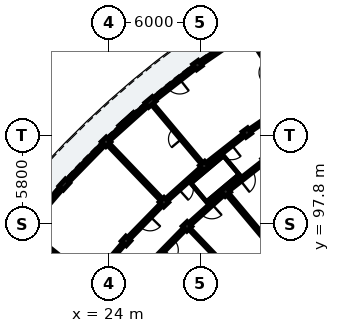
"""IFC4 building model, lengths in metres.
Left out: names, types, materials, properties, quantities, classifications, styles, units other than length and angle.
Written with IfcOpenShell. Run it as: python <this file> out.ifc"""

import sys

from ifc_helpers import new_model, si_unit, direction, frame, frame_2d, origin, origin_2d, place, context, subcontext, project, spatial, rectangle, extrude, element, fill, save


model = new_model("IFC4")
c1 = context("Model", 3, precision=1e-05, world=origin(), true_north=direction((0.0, 1.0)))
c2 = subcontext(c1, "Body", "Model", "MODEL_VIEW")
j1 = project(units=[si_unit("LENGTHUNIT", "METRE"), si_unit("PLANEANGLEUNIT", "RADIAN")], contexts=[c1])
p1 = place(None, origin())
s1 = spatial("IfcSite", under=j1, at=p1, CompositionType="ELEMENT")
p2 = place(p1, origin())
s2 = spatial("IfcBuilding", under=s1, at=p2, CompositionType="ELEMENT")
p3 = place(p2, frame((0.0, 0.0, 42.44)))
s3 = spatial("IfcBuildingStorey", under=s2, at=p3, CompositionType="ELEMENT", Elevation=42.44)
for number, where, z_axis, x_axis in (
    (1, (33.061, 103.804, 0.0), (0.0, 0.0, 1.0), (-0.591, 0.807, 0.0)),
    (2, (29.811, 108.241, 0.0), (0.0, 0.0, 1.0), (-0.591, 0.807, 0.0)),
    (3, (31.671, 99.919, 0.0), (0.0, 0.0, 1.0), (-0.643, 0.766, 0.0)),
    (4, (30.257, 101.605, 0.0), (0.0, 0.0, 1.0), (-0.643, 0.766, 0.0)),
):
    element("IfcColumn", number, at=place(p3, frame(where, z_axis=z_axis, x_axis=x_axis)), inside=s3, PredefinedType="COLUMN", context=c2, shape_type="SweptSolid", body=[
        extrude(rectangle(XDim=0.45, YDim=0.45, at=origin_2d()), origin(), (0.0, 0.0, 1.0), 3.12),
    ])
p4 = place(p3, frame((26.722, 105.818, 0.0), z_axis=(0.0, 0.0, 1.0), x_axis=(-0.642787636427, 0.766044420681, 0.0)))
e5 = element("IfcColumn", 5, at=p4, inside=s3, PredefinedType="PILASTER", context=c2, shape_type="SweptSolid", body=[
    extrude(rectangle(XDim=0.39, YDim=0.63, at=origin_2d()), origin(), (0.0, 0.0, 1.0), 3.12),
])
for number, where, z_axis, x_axis in (
    (6, (29.127, 97.637, 0.0), (0.0, 0.0, 1.0), (-0.692, 0.722, 0.0)),
    (7, (27.605, 99.226, 0.0), (0.0, 0.0, 1.0), (-0.692, 0.722, 0.0)),
    (8, (23.8, 103.197, 0.0), (0.0, 0.0, 1.0), (-0.692, 0.722, 0.0)),
    (9, (25.115, 96.677, 0.0), (0.0, 0.0, 1.0), (-0.738, 0.675, 0.0)),
):
    element("IfcColumn", number, at=place(p3, frame(where, z_axis=z_axis, x_axis=x_axis)), inside=s3, PredefinedType="COLUMN", context=c2, shape_type="SweptSolid", body=[
        extrude(rectangle(XDim=0.45, YDim=0.45, at=origin_2d()), origin(), (0.0, 0.0, 1.0), 3.12),
    ])
p5 = place(p3, frame((21.056, 100.389, 0.0), z_axis=(0.0, 0.0, 1.0), x_axis=(-0.737932089665, 0.674874974378, 0.0)))
e10 = element("IfcColumn", 10, at=p5, inside=s3, PredefinedType="PILASTER", context=c2, shape_type="SweptSolid", body=[
    extrude(rectangle(XDim=0.39, YDim=0.63, at=origin_2d()), origin(), (0.0, 0.0, 1.0), 3.12),
])
p6 = place(p3, frame((32.916, 110.362, 0.0), z_axis=(0.0, 0.0, 1.0), x_axis=(-0.825772203118, -0.564003784169, 0.0)))
e11 = element("IfcWall", 11, at=p6, inside=s3, PredefinedType="SOLIDWALL", context=c2, shape_type="SweptSolid", body=[
    extrude(rectangle(XDim=3.566, YDim=0.225, at=frame_2d((1.783, 0.0))), origin(), (0.0, 0.0, 1.0), 2.355),
])
p7 = place(p6, frame((0.943, 0.0, 0.55)))
e12 = element("IfcOpeningElement", 12, at=p7, cuts=e11, PredefinedType="OPENING", context=c2, shape_type="SweptSolid", body=[
    extrude(rectangle(XDim=1.68, YDim=1.585, at=frame_2d((0.84, 0.792))), frame((0.0, 0.123, 0.0), z_axis=(0.0, -1.0, 0.0), x_axis=(1.0, 0.0, 0.0)), (0.0, 0.0, 1.0), 0.245),
])
p8 = place(p3, frame((29.657, 108.121, 0.0), z_axis=(0.0, 0.0, 1.0), x_axis=(-0.786798003455, -0.617210581374, 0.0)))
e13 = element("IfcWall", 13, at=p8, inside=s3, PredefinedType="SOLIDWALL", context=c2, shape_type="SweptSolid", body=[
    extrude(rectangle(XDim=3.566, YDim=0.225, at=frame_2d((1.783, 0.0))), origin(), (0.0, 0.0, 1.0), 2.355),
])
p9 = place(p8, frame((1.293, 0.0, 0.0)))
e14 = element("IfcOpeningElement", 14, at=p9, cuts=e13, PredefinedType="OPENING", context=c2, shape_type="SweptSolid", body=[
    extrude(rectangle(XDim=0.98, YDim=2.12, at=frame_2d((0.49, 1.06))), frame((0.0, 0.123, 0.0), z_axis=(0.0, -1.0, 0.0), x_axis=(1.0, 0.0, 0.0)), (0.0, 0.0, 1.0), 0.245),
])
p10 = place(p3, frame((26.599, 105.708, 0.0), z_axis=(0.0, 0.0, 1.0), x_axis=(-0.744409820675, -0.667723010598, 0.0)))
e15 = element("IfcWall", 15, at=p10, inside=s3, PredefinedType="SOLIDWALL", context=c2, shape_type="SweptSolid", body=[
    extrude(rectangle(XDim=3.566, YDim=0.225, at=frame_2d((1.783, 0.0))), origin(), (0.0, 0.0, 1.0), 2.355),
])
p11 = place(p10, frame((1.133, 0.0, 0.55)))
e16 = element("IfcOpeningElement", 16, at=p11, cuts=e15, PredefinedType="OPENING", context=c2, shape_type="SweptSolid", body=[
    extrude(rectangle(XDim=1.3, YDim=1.6, at=frame_2d((0.65, 0.8))), frame((0.0, 0.123, 0.0), z_axis=(0.0, -1.0, 0.0), x_axis=(1.0, 0.0, 0.0)), (0.0, 0.0, 1.0), 0.245),
])
p12 = place(p3, frame((23.663, 103.057, 0.0), z_axis=(0.0, 0.0, 1.0), x_axis=(-0.698843003546, -0.715275091412, 0.0)))
e17 = element("IfcWall", 17, at=p12, inside=s3, PredefinedType="SOLIDWALL", context=c2, shape_type="SweptSolid", body=[
    extrude(rectangle(XDim=3.566, YDim=0.225, at=frame_2d((1.783, 0.0))), origin(), (0.0, 0.0, 1.0), 2.355),
])
p13 = place(p12, frame((1.058, 0.0, 0.35)))
e18 = element("IfcOpeningElement", 18, at=p13, cuts=e17, PredefinedType="OPENING", context=c2, shape_type="SweptSolid", body=[
    extrude(rectangle(XDim=1.45, YDim=1.7, at=frame_2d((0.725, 0.85))), frame((0.0, 0.123, 0.0), z_axis=(0.0, -1.0, 0.0), x_axis=(1.0, 0.0, 0.0)), (0.0, 0.0, 1.0), 0.245),
])
p14 = place(p3, frame((20.949, 100.263, 0.0), z_axis=(0.0, 0.0, 1.0), x_axis=(-0.650170917935, -0.759787981921, 0.0)))
e19 = element("IfcWall", 19, at=p14, inside=s3, PredefinedType="SOLIDWALL", context=c2, shape_type="SweptSolid", body=[
    extrude(rectangle(XDim=3.566, YDim=0.225, at=frame_2d((1.783, 0.0))), origin(), (0.0, 0.0, 1.0), 2.355),
])
p15 = place(p14, frame((0.983, 0.0, 0.35)))
e20 = element("IfcOpeningElement", 20, at=p15, cuts=e19, PredefinedType="OPENING", context=c2, shape_type="SweptSolid", body=[
    extrude(rectangle(XDim=1.6, YDim=1.75, at=frame_2d((0.8, 0.875))), frame((0.0, 0.123, 0.0), z_axis=(0.0, -1.0, 0.0), x_axis=(1.0, 0.0, 0.0)), (0.0, 0.0, 1.0), 0.245),
])
p16 = place(p3, frame((35.789, 106.151, 0.0), z_axis=(0.0, 0.0, 1.0), x_axis=(-0.536492262982, 0.843905238614, 0.0)))
e21 = element("IfcWall", 21, at=p16, inside=s3, PredefinedType="PARTITIONING", context=c2, shape_type="SweptSolid", body=[
    extrude(rectangle(XDim=4.7, YDim=0.125, at=frame_2d((2.35, 0.0))), origin(), (0.0, 0.0, 1.0), 2.37),
])
p17 = place(p16, frame((1.895, 0.0, 0.0)))
e22 = element("IfcOpeningElement", 22, at=p17, cuts=e21, PredefinedType="OPENING", context=c2, shape_type="SweptSolid", body=[
    extrude(rectangle(XDim=0.91, YDim=2.1, at=frame_2d((0.455, 1.05))), frame((0.0, 0.073, 0.0), z_axis=(0.0, -1.0, 0.0), x_axis=(1.0, 0.0, 0.0)), (0.0, 0.0, 1.0), 0.145),
])
p18 = place(p3, frame((35.714, 105.616, 0.0), z_axis=(0.0, 0.0, 1.0), x_axis=(-0.825779671787, -0.563992848947, 0.0)))
e23 = element("IfcWall", 23, at=p18, inside=s3, PredefinedType="PARTITIONING", context=c2, shape_type="SweptSolid", body=[
    extrude(rectangle(XDim=2.863, YDim=0.205, at=frame_2d((1.432, 0.0))), origin(), (0.0, 0.0, 1.0), 2.37),
])
p19 = place(p18, frame((0.967, 0.0, 0.0)))
e24 = element("IfcOpeningElement", 24, at=p19, cuts=e23, PredefinedType="OPENING", context=c2, shape_type="SweptSolid", body=[
    extrude(rectangle(XDim=0.93, YDim=2.12, at=frame_2d((0.465, 1.06))), frame((0.0, 0.113, 0.0), z_axis=(0.0, -1.0, 0.0), x_axis=(1.0, 0.0, 0.0)), (0.0, 0.0, 1.0), 0.225),
])
p20 = place(p3, frame((32.785, 103.588, 0.0), z_axis=(0.0, 0.0, 1.0), x_axis=(-0.786806323554, -0.617199975061, 0.0)))
e25 = element("IfcWall", 25, at=p20, inside=s3, PredefinedType="PARTITIONING", context=c2, shape_type="SweptSolid", body=[
    extrude(rectangle(XDim=2.863, YDim=0.205, at=frame_2d((1.432, 0.0))), origin(), (0.0, 0.0, 1.0), 2.37),
])
p21 = place(p20, frame((0.937, 0.0, 0.0)))
e26 = element("IfcOpeningElement", 26, at=p21, cuts=e25, PredefinedType="OPENING", context=c2, shape_type="SweptSolid", body=[
    extrude(rectangle(XDim=0.99, YDim=2.16, at=frame_2d((0.495, 1.08))), frame((0.0, 0.113, 0.0), z_axis=(0.0, -1.0, 0.0), x_axis=(1.0, 0.0, 0.0)), (0.0, 0.0, 1.0), 0.225),
])
p22 = place(p3, frame((34.085, 101.813, 0.0), z_axis=(0.0, 0.0, 1.0), x_axis=(-0.786835457019, -0.617162833924, 0.0)))
e27 = element("IfcWall", 27, at=p22, inside=s3, PredefinedType="PARTITIONING", context=c2, shape_type="SweptSolid", body=[
    extrude(rectangle(XDim=2.718, YDim=0.205, at=frame_2d((1.359, 0.0))), origin(), (0.0, 0.0, 1.0), 2.37),
])
p23 = place(p22, frame((0.864, 0.0, 0.0)))
e28 = element("IfcOpeningElement", 28, at=p23, cuts=e27, PredefinedType="OPENING", context=c2, shape_type="SweptSolid", body=[
    extrude(rectangle(XDim=0.99, YDim=2.16, at=frame_2d((0.495, 1.08))), frame((0.0, 0.113, 0.0), z_axis=(0.0, -1.0, 0.0), x_axis=(1.0, 0.0, 0.0)), (0.0, 0.0, 1.0), 0.225),
])
p24 = place(p3, frame((30.0, 101.911, 0.0), z_axis=(0.0, 0.0, 1.0), x_axis=(-0.642811926223, 0.766024038465, 0.0)))
e29 = element("IfcWall", 29, at=p24, inside=s3, PredefinedType="PLUMBINGWALL", context=c2, shape_type="SweptSolid", body=[
    extrude(rectangle(XDim=4.7, YDim=0.14, at=frame_2d((2.35, 0.0))), origin(), (0.0, 0.0, 1.0), 2.37),
])
p25 = place(p24, frame((1.92, 0.0, 0.0)))
e30 = element("IfcOpeningElement", 30, at=p25, cuts=e29, PredefinedType="OPENING", context=c2, shape_type="SweptSolid", body=[
    extrude(rectangle(XDim=0.86, YDim=2.06, at=frame_2d((0.43, 1.03))), frame((0.0, 0.08, 0.0), z_axis=(0.0, -1.0, 0.0), x_axis=(1.0, 0.0, 0.0)), (0.0, 0.0, 1.0), 0.16),
])
p26 = place(p3, frame((36.171, 94.557, 0.0), z_axis=(0.0, 0.0, 1.0), x_axis=(-0.642789470807, 0.766042881449, 0.0)))
e31 = element("IfcWall", 31, at=p26, inside=s3, PredefinedType="PARTITIONING", context=c2, shape_type="SweptSolid", body=[
    extrude(rectangle(XDim=6.6, YDim=0.185, at=frame_2d((3.3, 0.0))), origin(), (0.0, 0.0, 1.0), 2.37),
])
p27 = place(p3, frame((29.997, 101.371, 0.0), z_axis=(0.0, 0.0, 1.0), x_axis=(-0.744433521088, -0.667696587291, 0.0)))
e32 = element("IfcWall", 32, at=p27, inside=s3, PredefinedType="PARTITIONING", context=c2, shape_type="SweptSolid", body=[
    extrude(rectangle(XDim=2.863, YDim=0.205, at=frame_2d((1.432, 0.0))), origin(), (0.0, 0.0, 1.0), 2.37),
])
p28 = place(p27, frame((0.947, 0.0, 0.0)))
e33 = element("IfcOpeningElement", 33, at=p28, cuts=e32, PredefinedType="OPENING", context=c2, shape_type="SweptSolid", body=[
    extrude(rectangle(XDim=0.97, YDim=2.15, at=frame_2d((0.485, 1.075))), frame((0.0, 0.113, 0.0), z_axis=(0.0, -1.0, 0.0), x_axis=(1.0, 0.0, 0.0)), (0.0, 0.0, 1.0), 0.225),
])
p29 = place(p3, frame((31.411, 99.686, 0.0), z_axis=(0.0, 0.0, 1.0), x_axis=(-0.744418559135, -0.667713268413, 0.0)))
e34 = element("IfcWall", 34, at=p29, inside=s3, PredefinedType="PARTITIONING", context=c2, shape_type="SweptSolid", body=[
    extrude(rectangle(XDim=2.718, YDim=0.205, at=frame_2d((1.359, 0.0))), origin(), (0.0, 0.0, 1.0), 2.37),
])
p30 = place(p29, frame((0.874, 0.0, 0.0)))
e35 = element("IfcOpeningElement", 35, at=p30, cuts=e34, PredefinedType="OPENING", context=c2, shape_type="SweptSolid", body=[
    extrude(rectangle(XDim=0.97, YDim=2.15, at=frame_2d((0.485, 1.075))), frame((0.0, 0.113, 0.0), z_axis=(0.0, -1.0, 0.0), x_axis=(1.0, 0.0, 0.0)), (0.0, 0.0, 1.0), 0.225),
])
p31 = place(p3, frame((27.328, 99.514, 0.0), z_axis=(0.0, 0.0, 1.0), x_axis=(-0.691882799356, 0.722009828157, 0.0)))
e36 = element("IfcWall", 36, at=p31, inside=s3, PredefinedType="PARTITIONING", context=c2, shape_type="SweptSolid", body=[
    extrude(rectangle(XDim=4.7, YDim=0.185, at=frame_2d((2.35, 0.0))), origin(), (0.0, 0.0, 1.0), 2.37),
])
p32 = place(p3, frame((33.97, 92.583, 0.0), z_axis=(0.0, 0.0, 1.0), x_axis=(-0.691872422458, 0.722019771919, 0.0)))
e37 = element("IfcWall", 37, at=p32, inside=s3, PredefinedType="PARTITIONING", context=c2, shape_type="SweptSolid", body=[
    extrude(rectangle(XDim=6.6, YDim=0.125, at=frame_2d((3.3, 0.0))), origin(), (0.0, 0.0, 1.0), 2.37),
])
p33 = place(p32, frame((2.855, 0.0, 0.0)))
e38 = element("IfcOpeningElement", 38, at=p33, cuts=e37, PredefinedType="OPENING", context=c2, shape_type="SweptSolid", body=[
    extrude(rectangle(XDim=0.89, YDim=2.1, at=frame_2d((0.445, 1.05))), frame((0.0, 0.073, 0.0), z_axis=(0.0, -1.0, 0.0), x_axis=(1.0, 0.0, 0.0)), (0.0, 0.0, 1.0), 0.145),
])
p34 = place(p3, frame((27.36, 98.975, 0.0), z_axis=(0.0, 0.0, 1.0), x_axis=(-0.698787219683, -0.715329589496, 0.0)))
e39 = element("IfcWall", 39, at=p34, inside=s3, PredefinedType="PARTITIONING", context=c2, shape_type="SweptSolid", body=[
    extrude(rectangle(XDim=2.863, YDim=0.205, at=frame_2d((1.432, 0.0))), origin(), (0.0, 0.0, 1.0), 2.37),
])
p35 = place(p34, frame((0.957, 0.0, 0.0)))
e40 = element("IfcOpeningElement", 40, at=p35, cuts=e39, PredefinedType="OPENING", context=c2, shape_type="SweptSolid", body=[
    extrude(rectangle(XDim=0.95, YDim=2.13, at=frame_2d((0.475, 1.065))), frame((0.0, 0.113, 0.0), z_axis=(0.0, -1.0, 0.0), x_axis=(1.0, 0.0, 0.0)), (0.0, 0.0, 1.0), 0.225),
])
p36 = place(p3, frame((28.882, 97.387, 0.0), z_axis=(0.0, 0.0, 1.0), x_axis=(-0.698840007829, -0.715278018296, 0.0)))
e41 = element("IfcWall", 41, at=p36, inside=s3, PredefinedType="PARTITIONING", context=c2, shape_type="SweptSolid", body=[
    extrude(rectangle(XDim=2.718, YDim=0.205, at=frame_2d((1.359, 0.0))), origin(), (0.0, 0.0, 1.0), 2.37),
])
p37 = place(p36, frame((0.884, 0.0, 0.0)))
e42 = element("IfcOpeningElement", 42, at=p37, cuts=e41, PredefinedType="OPENING", context=c2, shape_type="SweptSolid", body=[
    extrude(rectangle(XDim=0.95, YDim=2.13, at=frame_2d((0.475, 1.065))), frame((0.0, 0.113, 0.0), z_axis=(0.0, -1.0, 0.0), x_axis=(1.0, 0.0, 0.0)), (0.0, 0.0, 1.0), 0.225),
])
p38 = place(p3, frame((24.887, 96.411, 0.0), z_axis=(0.0, 0.0, 1.0), x_axis=(-0.650194272684, -0.759767996015, 0.0)))
e43 = element("IfcWall", 43, at=p38, inside=s3, PredefinedType="PARTITIONING", context=c2, shape_type="SweptSolid", body=[
    extrude(rectangle(XDim=2.863, YDim=0.205, at=frame_2d((1.432, 0.0))), origin(), (0.0, 0.0, 1.0), 2.37),
])
p39 = place(p38, frame((0.967, 0.0, 0.0)))
e44 = element("IfcOpeningElement", 44, at=p39, cuts=e43, PredefinedType="OPENING", context=c2, shape_type="SweptSolid", body=[
    extrude(rectangle(XDim=0.93, YDim=2.12, at=frame_2d((0.465, 1.06))), frame((0.0, 0.113, 0.0), z_axis=(0.0, -1.0, 0.0), x_axis=(1.0, 0.0, 0.0)), (0.0, 0.0, 1.0), 0.225),
])
p40 = place(p3, frame((22.486, 94.22, 0.0), z_axis=(0.0, 0.0, 1.0), x_axis=(-0.780807994362, 0.624771058821, 0.0)))
e45 = element("IfcWall", 45, at=p40, inside=s3, PredefinedType="PARTITIONING", context=c2, shape_type="SweptSolid", body=[
    extrude(rectangle(XDim=4.7, YDim=0.185, at=frame_2d((2.35, 0.0))), origin(), (0.0, 0.0, 1.0), 2.37),
])
p41 = place(p7, origin())
e46 = element("IfcWindow", 46, at=p41, inside=s3, PartitioningType="SINGLE_PANEL", PredefinedType="WINDOW", context=c2, shape_type="SweptSolid", body=[
    extrude(rectangle(XDim=1.68, YDim=1.585, at=frame_2d((0.84, 0.792))), frame((0.0, 0.03, 0.0), z_axis=(0.0, -1.0, 0.0), x_axis=(1.0, 0.0, 0.0)), (0.0, 0.0, 1.0), 0.06),
])
fill(e12, e46)
p42 = place(p9, origin())
e47 = element("IfcDoor", 47, at=p42, inside=s3, OperationType="SINGLE_SWING_LEFT", PredefinedType="DOOR", context=c2, shape_type="SweptSolid", body=[
    extrude(rectangle(XDim=0.98, YDim=2.12, at=frame_2d((0.49, 1.06))), frame((0.0, 0.025, 0.0), z_axis=(0.0, -1.0, 0.0), x_axis=(1.0, 0.0, 0.0)), (0.0, 0.0, 1.0), 0.05),
])
fill(e14, e47)
p43 = place(p11, origin())
e48 = element("IfcWindow", 48, at=p43, inside=s3, PartitioningType="SINGLE_PANEL", PredefinedType="WINDOW", context=c2, shape_type="SweptSolid", body=[
    extrude(rectangle(XDim=1.3, YDim=1.6, at=frame_2d((0.65, 0.8))), frame((0.0, 0.03, 0.0), z_axis=(0.0, -1.0, 0.0), x_axis=(1.0, 0.0, 0.0)), (0.0, 0.0, 1.0), 0.06),
])
fill(e16, e48)
p44 = place(p13, origin())
e49 = element("IfcWindow", 49, at=p44, inside=s3, PartitioningType="SINGLE_PANEL", PredefinedType="WINDOW", context=c2, shape_type="SweptSolid", body=[
    extrude(rectangle(XDim=1.45, YDim=1.7, at=frame_2d((0.725, 0.85))), frame((0.0, 0.03, 0.0), z_axis=(0.0, -1.0, 0.0), x_axis=(1.0, 0.0, 0.0)), (0.0, 0.0, 1.0), 0.06),
])
fill(e18, e49)
p45 = place(p15, origin())
e50 = element("IfcWindow", 50, at=p45, inside=s3, PartitioningType="SINGLE_PANEL", PredefinedType="WINDOW", context=c2, shape_type="SweptSolid", body=[
    extrude(rectangle(XDim=1.6, YDim=1.75, at=frame_2d((0.8, 0.875))), frame((0.0, 0.03, 0.0), z_axis=(0.0, -1.0, 0.0), x_axis=(1.0, 0.0, 0.0)), (0.0, 0.0, 1.0), 0.06),
])
fill(e20, e50)
p46 = place(p21, origin())
e51 = element("IfcDoor", 51, at=p46, inside=s3, OperationType="SINGLE_SWING_LEFT", PredefinedType="DOOR", context=c2, shape_type="SweptSolid", body=[
    extrude(rectangle(XDim=0.99, YDim=2.16, at=frame_2d((0.495, 1.08))), frame((0.0, 0.025, 0.0), z_axis=(0.0, -1.0, 0.0), x_axis=(1.0, 0.0, 0.0)), (0.0, 0.0, 1.0), 0.05),
])
fill(e26, e51)
p47 = place(p23, origin())
e52 = element("IfcDoor", 52, at=p47, inside=s3, OperationType="SINGLE_SWING_RIGHT", PredefinedType="DOOR", context=c2, shape_type="SweptSolid", body=[
    extrude(rectangle(XDim=0.99, YDim=2.16, at=frame_2d((0.495, 1.08))), frame((0.0, 0.025, 0.0), z_axis=(0.0, -1.0, 0.0), x_axis=(1.0, 0.0, 0.0)), (0.0, 0.0, 1.0), 0.05),
])
fill(e28, e52)
p48 = place(p25, origin())
e53 = element("IfcDoor", 53, at=p48, inside=s3, OperationType="SINGLE_SWING_LEFT", PredefinedType="DOOR", context=c2, shape_type="SweptSolid", body=[
    extrude(rectangle(XDim=0.86, YDim=2.06, at=frame_2d((0.43, 1.03))), frame((0.0, 0.025, 0.0), z_axis=(0.0, -1.0, 0.0), x_axis=(1.0, 0.0, 0.0)), (0.0, 0.0, 1.0), 0.05),
])
fill(e30, e53)
p49 = place(p28, origin())
e54 = element("IfcDoor", 54, at=p49, inside=s3, OperationType="SINGLE_SWING_RIGHT", PredefinedType="DOOR", context=c2, shape_type="SweptSolid", body=[
    extrude(rectangle(XDim=0.97, YDim=2.15, at=frame_2d((0.485, 1.075))), frame((0.0, 0.025, 0.0), z_axis=(0.0, -1.0, 0.0), x_axis=(1.0, 0.0, 0.0)), (0.0, 0.0, 1.0), 0.05),
])
fill(e33, e54)
p50 = place(p30, origin())
e55 = element("IfcDoor", 55, at=p50, inside=s3, OperationType="SINGLE_SWING_LEFT", PredefinedType="DOOR", context=c2, shape_type="SweptSolid", body=[
    extrude(rectangle(XDim=0.97, YDim=2.15, at=frame_2d((0.485, 1.075))), frame((0.0, 0.025, 0.0), z_axis=(0.0, -1.0, 0.0), x_axis=(1.0, 0.0, 0.0)), (0.0, 0.0, 1.0), 0.05),
])
fill(e35, e55)
p51 = place(p35, origin())
e56 = element("IfcDoor", 56, at=p51, inside=s3, OperationType="SINGLE_SWING_LEFT", PredefinedType="DOOR", context=c2, shape_type="SweptSolid", body=[
    extrude(rectangle(XDim=0.95, YDim=2.13, at=frame_2d((0.475, 1.065))), frame((0.0, 0.025, 0.0), z_axis=(0.0, -1.0, 0.0), x_axis=(1.0, 0.0, 0.0)), (0.0, 0.0, 1.0), 0.05),
])
fill(e40, e56)
p52 = place(p37, origin())
e57 = element("IfcDoor", 57, at=p52, inside=s3, OperationType="SINGLE_SWING_RIGHT", PredefinedType="DOOR", context=c2, shape_type="SweptSolid", body=[
    extrude(rectangle(XDim=0.95, YDim=2.13, at=frame_2d((0.475, 1.065))), frame((0.0, 0.025, 0.0), z_axis=(0.0, -1.0, 0.0), x_axis=(1.0, 0.0, 0.0)), (0.0, 0.0, 1.0), 0.05),
])
fill(e42, e57)
save(model, sys.argv[1])
